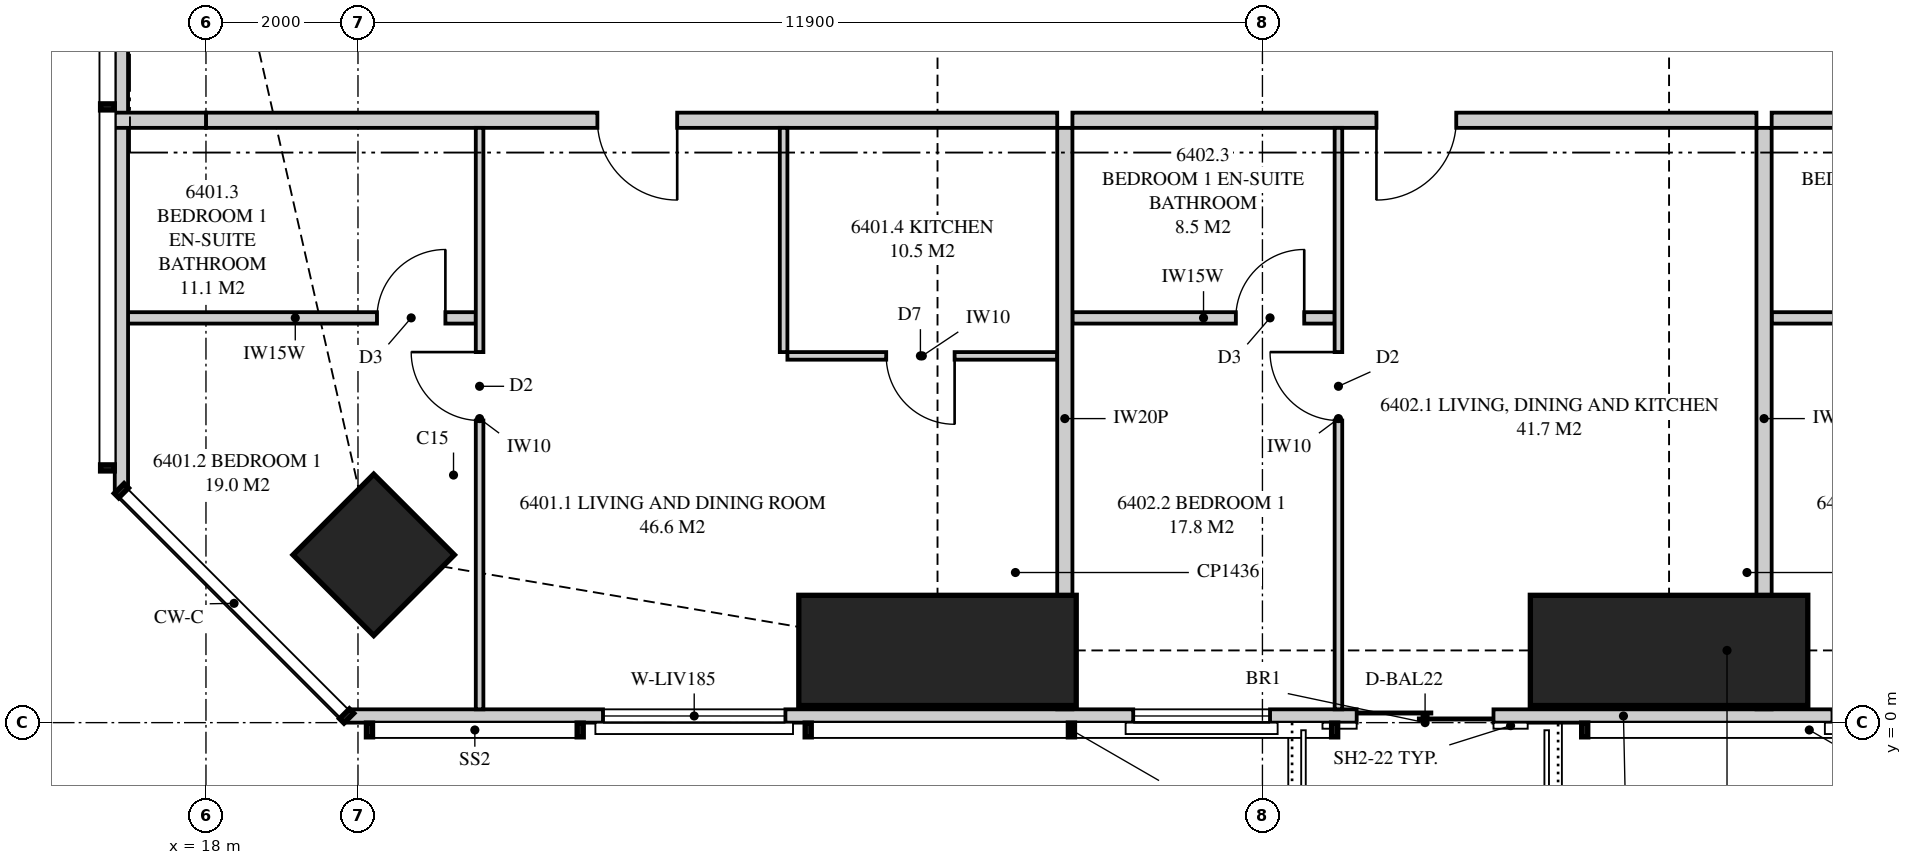
"""IFC4 building model, lengths in metres.
Left out: names, types, materials, properties, quantities, classifications, styles, units other than length and angle.
Written with IfcOpenShell. Run it as: python <this file> out.ifc"""

import sys

from ifc_helpers import new_model, si_unit, direction, frame, frame_2d, origin, origin_2d, place, context, subcontext, project, spatial, polyline, rectangle, outline, extrude, element, fill, save


model = new_model("IFC4")
c1 = context("Model", 3, precision=1e-05, world=origin(), true_north=direction((0.0, 1.0)))
c2 = subcontext(c1, "Body", "Model", "MODEL_VIEW")
j1 = project(units=[si_unit("LENGTHUNIT", "METRE"), si_unit("PLANEANGLEUNIT", "RADIAN")], contexts=[c1])
p1 = place(None, origin())
s1 = spatial("IfcSite", under=j1, at=p1, CompositionType="ELEMENT")
p2 = place(p1, origin())
s2 = spatial("IfcBuilding", under=s1, at=p2, CompositionType="ELEMENT")
p3 = place(p2, frame((0.0, 0.0, 235.45)))
s3 = spatial("IfcBuildingStorey", under=s2, at=p3, CompositionType="ELEMENT", Elevation=235.45)
p4 = place(p3, frame((20.207, 2.207, 0.0), z_axis=(0.0, 0.0, 1.0), x_axis=(0.707106781187, 0.707106781187, 0.0)))
e1 = element("IfcColumn", 1, at=p4, inside=s3, PredefinedType="COLUMN", context=c2, shape_type="SweptSolid", body=[
    extrude(rectangle(XDim=1.5, YDim=1.5, at=origin_2d()), origin(), (0.0, 0.0, 1.0), 3.5),
])
for number, where, z_axis, x_axis in (
    (2, (27.625, 0.95, 0.0), (0.0, 0.0, 1.0), (0.0, 1.0, 0.0)),
    (3, (37.25, 0.95, 0.0), (0.0, 0.0, 1.0), (0.0, 1.0, 0.0)),
):
    element("IfcColumn", number, at=place(p3, frame(where, z_axis=z_axis, x_axis=x_axis)), inside=s3, PredefinedType="COLUMN", context=c2, shape_type="SweptSolid", body=[
        extrude(rectangle(XDim=1.45, YDim=3.65, at=origin_2d()), origin(), (0.0, 0.0, 1.0), 3.5),
    ])
p5 = place(p3, frame((19.851, 0.087, 0.0), z_axis=(0.0, 0.0, 1.0), x_axis=(1.0, 0.0, 0.0)))
e4 = element("IfcWall", 4, at=p5, inside=s3, PredefinedType="SOLIDWALL", context=c2, shape_type="SweptSolid", body=[
    extrude(outline(polyline([(0.0, 0.0), (33.597, 0.0), (33.597, 3.26), (27.239, 3.26), (27.239, 2.3), (27.155, 2.3), (27.155, 3.26), (27.024, 3.26), (27.024, 2.3), (7.774, 2.3), (7.774, 3.26), (7.642, 3.26), (7.642, 2.3), (7.559, 2.3), (7.559, 3.26), (0.0, 3.26), (0.0, 0.0)])), frame((0.0, 0.087, 0.0), z_axis=(0.0, -1.0, 0.0), x_axis=(1.0, 0.0, 0.0)), (0.0, 0.0, 1.0), 0.175),
])
p6 = place(p5, frame((3.373, 0.0, 0.4)))
e5 = element("IfcOpeningElement", 5, at=p6, cuts=e4, PredefinedType="OPENING", context=c2, shape_type="SweptSolid", body=[
    extrude(rectangle(XDim=2.4, YDim=1.85, at=frame_2d((1.2, 0.925))), frame((0.0, 0.097, 0.0), z_axis=(0.0, -1.0, 0.0), x_axis=(1.0, 0.0, 0.0)), (0.0, 0.0, 1.0), 0.195),
])
p7 = place(p5, frame((10.349, 0.0, 0.4)))
e6 = element("IfcOpeningElement", 6, at=p7, cuts=e4, PredefinedType="OPENING", context=c2, shape_type="SweptSolid", body=[
    extrude(rectangle(XDim=1.8, YDim=1.85, at=frame_2d((0.9, 0.925))), frame((0.0, 0.097, 0.0), z_axis=(0.0, -1.0, 0.0), x_axis=(1.0, 0.0, 0.0)), (0.0, 0.0, 1.0), 0.195),
])
p8 = place(p5, frame((13.289, 0.0, 0.0)))
e7 = element("IfcOpeningElement", 7, at=p8, cuts=e4, PredefinedType="OPENING", context=c2, shape_type="SweptSolid", body=[
    extrude(rectangle(XDim=1.8, YDim=2.25, at=frame_2d((0.9, 1.125))), frame((0.0, 0.097, 0.0), z_axis=(0.0, -1.0, 0.0), x_axis=(1.0, 0.0, 0.0)), (0.0, 0.0, 1.0), 0.195),
])
p9 = place(p5, frame((19.549, 0.0, 0.4)))
e8 = element("IfcOpeningElement", 8, at=p9, cuts=e4, PredefinedType="OPENING", context=c2, shape_type="SweptSolid", body=[
    extrude(rectangle(XDim=1.8, YDim=1.85, at=frame_2d((0.9, 0.925))), frame((0.0, 0.097, 0.0), z_axis=(0.0, -1.0, 0.0), x_axis=(1.0, 0.0, 0.0)), (0.0, 0.0, 1.0), 0.195),
])
p10 = place(p5, frame((23.149, 0.0, 0.4)))
e9 = element("IfcOpeningElement", 9, at=p10, cuts=e4, PredefinedType="OPENING", context=c2, shape_type="SweptSolid", body=[
    extrude(rectangle(XDim=1.8, YDim=1.85, at=frame_2d((0.9, 0.925))), frame((0.0, 0.097, 0.0), z_axis=(0.0, -1.0, 0.0), x_axis=(1.0, 0.0, 0.0)), (0.0, 0.0, 1.0), 0.195),
])
p11 = place(p5, frame((28.979, 0.0, 0.4)))
e10 = element("IfcOpeningElement", 10, at=p11, cuts=e4, PredefinedType="OPENING", context=c2, shape_type="SweptSolid", body=[
    extrude(rectangle(XDim=1.8, YDim=1.85, at=frame_2d((0.9, 0.925))), frame((0.0, 0.097, 0.0), z_axis=(0.0, -1.0, 0.0), x_axis=(1.0, 0.0, 0.0)), (0.0, 0.0, 1.0), 0.195),
])
p12 = place(p5, frame((31.861, 0.0, 0.4)))
e11 = element("IfcOpeningElement", 11, at=p12, cuts=e4, PredefinedType="OPENING", context=c2, shape_type="SweptSolid", body=[
    extrude(rectangle(XDim=1.2, YDim=1.85, at=frame_2d((0.6, 0.925))), frame((0.0, 0.097, 0.0), z_axis=(0.0, -1.0, 0.0), x_axis=(1.0, 0.0, 0.0)), (0.0, 0.0, 1.0), 0.195),
])
p13 = place(p3, frame((16.887, 30.949, 0.0), z_axis=(0.0, 0.0, 1.0), x_axis=(0.0, -1.0, 0.0)))
e12 = element("IfcWall", 12, at=p13, inside=s3, PredefinedType="SOLIDWALL", context=c2, shape_type="SweptSolid", body=[
    extrude(outline(polyline([(0.0, 0.0), (27.897, 0.0), (27.897, 3.26), (18.148, 3.26), (18.148, 2.3), (18.125, 2.3), (18.125, 3.26), (17.949, 3.26), (17.949, 2.3), (5.949, 2.3), (5.949, 3.26), (0.0, 3.26), (0.0, 0.0)])), frame((0.0, 0.087, 0.0), z_axis=(0.0, -1.0, 0.0), x_axis=(1.0, 0.0, 0.0)), (0.0, 0.0, 1.0), 0.175),
])
p14 = place(p13, frame((11.849, 0.0, 0.4)))
e13 = element("IfcOpeningElement", 13, at=p14, cuts=e12, PredefinedType="OPENING", context=c2, shape_type="SweptSolid", body=[
    extrude(rectangle(XDim=1.2, YDim=1.85, at=frame_2d((0.6, 0.925))), frame((0.0, 0.097, 0.0), z_axis=(0.0, -1.0, 0.0), x_axis=(1.0, 0.0, 0.0)), (0.0, 0.0, 1.0), 0.195),
])
p15 = place(p3, frame((29.3, 0.175, 0.0), z_axis=(0.0, 0.0, 1.0), x_axis=(0.0, 1.0, 0.0)))
e14 = element("IfcWall", 14, at=p15, inside=s3, PredefinedType="PARTITIONING", context=c2, shape_type="SweptSolid", body=[
    extrude(outline(polyline([(0.0, 0.0), (7.65, 0.0), (7.65, 3.26), (1.685, 3.26), (1.685, 2.3), (0.0, 2.3), (0.0, 3.26), (0.0, 0.0)])), frame((0.0, 0.1, 0.0), z_axis=(0.0, -1.0, 0.0), x_axis=(1.0, 0.0, 0.0)), (0.0, 0.0, 1.0), 0.2),
])
p16 = place(p3, frame((18.0, 7.925, 0.0), z_axis=(0.0, 0.0, 1.0), x_axis=(1.0, 0.0, 0.0)))
e15 = element("IfcWall", 15, at=p16, inside=s3, PredefinedType="PARTITIONING", context=c2, shape_type="SweptSolid", body=[
    extrude(outline(polyline([(0.0, 0.0), (11.2, 0.0), (11.2, 3.26), (10.935, 3.26), (10.935, 2.66), (8.315, 2.66), (8.315, 3.26), (1.839, 3.26), (1.839, 2.3), (0.0, 2.3), (0.0, 3.26), (0.0, 0.0)])), frame((0.0, 0.1, 0.0), z_axis=(0.0, -1.0, 0.0), x_axis=(1.0, 0.0, 0.0)), (0.0, 0.0, 1.0), 0.2),
])
p17 = place(p16, frame((5.15, 0.0, 0.0)))
e16 = element("IfcOpeningElement", 16, at=p17, cuts=e15, PredefinedType="OPENING", context=c2, shape_type="SweptSolid", body=[
    extrude(rectangle(XDim=1.05, YDim=2.2, at=frame_2d((0.525, 1.1))), frame((0.0, 0.11, 0.0), z_axis=(0.0, -1.0, 0.0), x_axis=(1.0, 0.0, 0.0)), (0.0, 0.0, 1.0), 0.22),
])
p18 = place(p3, frame((21.6, 0.175, 0.0), z_axis=(0.0, 0.0, 1.0), x_axis=(0.0, 1.0, 0.0)))
e17 = element("IfcWall", 17, at=p18, inside=s3, PredefinedType="PARTITIONING", context=c2, shape_type="SweptSolid", body=[
    extrude(outline(polyline([(0.0, 0.0), (7.65, 0.0), (7.65, 3.26), (2.668, 3.26), (2.668, 2.3), (0.924, 2.3), (0.924, 3.26), (0.0, 3.26), (0.0, 0.0)])), frame((0.0, 0.05, 0.0), z_axis=(0.0, -1.0, 0.0), x_axis=(1.0, 0.0, 0.0)), (0.0, 0.0, 1.0), 0.1),
])
p19 = place(p18, frame((3.8, 0.0, 0.0)))
e18 = element("IfcOpeningElement", 18, at=p19, cuts=e17, PredefinedType="OPENING", context=c2, shape_type="SweptSolid", body=[
    extrude(rectangle(XDim=0.9, YDim=2.1, at=frame_2d((0.45, 1.05))), frame((0.0, 0.06, 0.0), z_axis=(0.0, -1.0, 0.0), x_axis=(1.0, 0.0, 0.0)), (0.0, 0.0, 1.0), 0.12),
])
p20 = place(p3, frame((16.8, 5.325, 0.0), z_axis=(0.0, 0.0, 1.0), x_axis=(1.0, 0.0, 0.0)))
e19 = element("IfcWall", 19, at=p20, inside=s3, PredefinedType="PLUMBINGWALL", context=c2, shape_type="SweptSolid", body=[
    extrude(outline(polyline([(0.0, 0.0), (4.75, 0.0), (4.75, 3.26), (3.605, 3.26), (3.605, 2.3), (1.79, 2.3), (1.79, 3.26), (0.0, 3.26), (0.0, 0.0)])), frame((0.0, 0.075, 0.0), z_axis=(0.0, -1.0, 0.0), x_axis=(1.0, 0.0, 0.0)), (0.0, 0.0, 1.0), 0.15),
])
p21 = place(p20, frame((3.45, 0.0, 0.0)))
e20 = element("IfcOpeningElement", 20, at=p21, cuts=e19, PredefinedType="OPENING", context=c2, shape_type="SweptSolid", body=[
    extrude(rectangle(XDim=0.9, YDim=2.1, at=frame_2d((0.45, 1.05))), frame((0.0, 0.085, 0.0), z_axis=(0.0, -1.0, 0.0), x_axis=(1.0, 0.0, 0.0)), (0.0, 0.0, 1.0), 0.17),
])
p22 = place(p3, frame((25.65, 4.825, 0.0), z_axis=(0.0, 0.0, 1.0), x_axis=(1.0, 0.0, 0.0)))
e21 = element("IfcWall", 21, at=p22, inside=s3, PredefinedType="PARTITIONING", context=c2, shape_type="SweptSolid", body=[
    extrude(outline(polyline([(0.0, 0.0), (3.55, 0.0), (3.55, 3.26), (3.235, 3.26), (3.235, 2.66), (0.715, 2.66), (0.715, 3.26), (0.0, 3.26), (0.0, 0.0)])), frame((0.0, 0.05, 0.0), z_axis=(0.0, -1.0, 0.0), x_axis=(1.0, 0.0, 0.0)), (0.0, 0.0, 1.0), 0.1),
])
p23 = place(p22, frame((1.3, 0.0, 0.0)))
e22 = element("IfcOpeningElement", 22, at=p23, cuts=e21, PredefinedType="OPENING", context=c2, shape_type="SweptSolid", body=[
    extrude(rectangle(XDim=0.9, YDim=2.1, at=frame_2d((0.45, 1.05))), frame((0.0, 0.06, 0.0), z_axis=(0.0, -1.0, 0.0), x_axis=(1.0, 0.0, 0.0)), (0.0, 0.0, 1.0), 0.12),
])
p24 = place(p3, frame((25.6, 4.875, 0.0), z_axis=(0.0, 0.0, 1.0), x_axis=(0.0, 1.0, 0.0)))
e23 = element("IfcWall", 23, at=p24, inside=s3, PredefinedType="PARTITIONING", context=c2, shape_type="SweptSolid", body=[
    extrude(rectangle(XDim=2.95, YDim=0.1, at=frame_2d((1.475, 0.0))), origin(), (0.0, 0.0, 1.0), 3.26),
])
p25 = place(p3, frame((38.5, 0.175, 0.0), z_axis=(0.0, 0.0, 1.0), x_axis=(0.0, 1.0, 0.0)))
e24 = element("IfcWall", 24, at=p25, inside=s3, PredefinedType="PARTITIONING", context=c2, shape_type="SweptSolid", body=[
    extrude(outline(polyline([(0.529, 2.3), (0.0, 2.3), (0.0, 0.0), (0.529, 0.0), (0.529, 0.281), (1.021, 0.281), (1.021, 0.0), (7.65, 0.0), (7.65, 2.66), (1.685, 2.66), (1.685, 2.3), (1.021, 2.3), (1.021, 2.019), (0.529, 2.019), (0.529, 2.3)])), frame((0.0, 0.1, 0.0), z_axis=(0.0, -1.0, 0.0), x_axis=(1.0, 0.0, 0.0)), (0.0, 0.0, 1.0), 0.2),
])
p26 = place(p3, frame((29.4, 7.925, 0.0), z_axis=(0.0, 0.0, 1.0), x_axis=(1.0, 0.0, 0.0)))
e25 = element("IfcWall", 25, at=p26, inside=s3, PredefinedType="PARTITIONING", context=c2, shape_type="SweptSolid", body=[
    extrude(outline(polyline([(0.0, 0.0), (9.0, 0.0), (9.0, 3.26), (9.0, 2.66), (6.54, 2.66), (6.54, 3.26), (0.0, 3.26), (0.0, 0.0)])), frame((0.0, 0.1, 0.0), z_axis=(0.0, -1.0, 0.0), x_axis=(1.0, 0.0, 0.0)), (0.0, 0.0, 1.0), 0.2),
])
p27 = place(p26, frame((4.0, 0.0, 0.0)))
e26 = element("IfcOpeningElement", 26, at=p27, cuts=e25, PredefinedType="OPENING", context=c2, shape_type="SweptSolid", body=[
    extrude(rectangle(XDim=1.05, YDim=2.2, at=frame_2d((0.525, 1.1))), frame((0.0, 0.11, 0.0), z_axis=(0.0, -1.0, 0.0), x_axis=(1.0, 0.0, 0.0)), (0.0, 0.0, 1.0), 0.22),
])
p28 = place(p3, frame((32.9, 0.175, 0.0), z_axis=(0.0, 0.0, 1.0), x_axis=(0.0, 1.0, 0.0)))
e27 = element("IfcWall", 27, at=p28, inside=s3, PredefinedType="PARTITIONING", context=c2, shape_type="SweptSolid", body=[
    extrude(outline(polyline([(0.0, 0.0), (7.65, 0.0), (7.65, 3.26), (1.635, 3.26), (1.635, 2.3), (0.0, 2.3), (0.0, 3.26), (0.0, 0.0)])), frame((0.0, 0.05, 0.0), z_axis=(0.0, -1.0, 0.0), x_axis=(1.0, 0.0, 0.0)), (0.0, 0.0, 1.0), 0.1),
])
p29 = place(p28, frame((3.8, 0.0, 0.0)))
e28 = element("IfcOpeningElement", 28, at=p29, cuts=e27, PredefinedType="OPENING", context=c2, shape_type="SweptSolid", body=[
    extrude(rectangle(XDim=0.9, YDim=2.1, at=frame_2d((0.45, 1.05))), frame((0.0, 0.06, 0.0), z_axis=(0.0, -1.0, 0.0), x_axis=(1.0, 0.0, 0.0)), (0.0, 0.0, 1.0), 0.12),
])
p30 = place(p3, frame((29.4, 5.325, 0.0), z_axis=(0.0, 0.0, 1.0), x_axis=(1.0, 0.0, 0.0)))
e29 = element("IfcWall", 29, at=p30, inside=s3, PredefinedType="PLUMBINGWALL", context=c2, shape_type="SweptSolid", body=[
    extrude(rectangle(XDim=3.45, YDim=0.15, at=frame_2d((1.725, 0.0))), origin(), (0.0, 0.0, 1.0), 3.26),
])
p31 = place(p30, frame((2.15, 0.0, 0.0)))
e30 = element("IfcOpeningElement", 30, at=p31, cuts=e29, PredefinedType="OPENING", context=c2, shape_type="SweptSolid", body=[
    extrude(rectangle(XDim=0.9, YDim=2.1, at=frame_2d((0.45, 1.05))), frame((0.0, 0.085, 0.0), z_axis=(0.0, -1.0, 0.0), x_axis=(1.0, 0.0, 0.0)), (0.0, 0.0, 1.0), 0.17),
])
p32 = place(p3, frame((38.6, 7.925, 0.0), z_axis=(0.0, 0.0, 1.0), x_axis=(1.0, 0.0, 0.0)))
e31 = element("IfcWall", 31, at=p32, inside=s3, PredefinedType="PARTITIONING", context=c2, shape_type="SweptSolid", body=[
    extrude(outline(polyline([(0.0, 0.0), (17.725, 0.0), (17.725, 3.26), (17.275, 3.26), (17.275, 2.3), (15.443, 2.3), (15.443, 3.26), (9.585, 3.26), (9.585, 2.66), (6.965, 2.66), (6.965, 3.26), (0.0, 3.26), (0.0, 0.0)])), frame((0.0, 0.1, 0.0), z_axis=(0.0, -1.0, 0.0), x_axis=(1.0, 0.0, 0.0)), (0.0, 0.0, 1.0), 0.2),
])
p33 = place(p32, frame((12.9, 0.0, 0.0)))
e32 = element("IfcOpeningElement", 32, at=p33, cuts=e31, PredefinedType="OPENING", context=c2, shape_type="SweptSolid", body=[
    extrude(rectangle(XDim=1.05, YDim=2.2, at=frame_2d((0.525, 1.1))), frame((0.0, 0.11, 0.0), z_axis=(0.0, -1.0, 0.0), x_axis=(1.0, 0.0, 0.0)), (0.0, 0.0, 1.0), 0.22),
])
p34 = place(p3, frame((38.6, 5.325, 0.0), z_axis=(0.0, 0.0, 1.0), x_axis=(1.0, 0.0, 0.0)))
e33 = element("IfcWall", 33, at=p34, inside=s3, PredefinedType="PLUMBINGWALL", context=c2, shape_type="SweptSolid", body=[
    extrude(rectangle(XDim=3.45, YDim=0.15, at=frame_2d((1.725, 0.0))), origin(), (0.0, 0.0, 1.0), 3.26),
])
p35 = place(p34, frame((2.15, 0.0, 0.0)))
e34 = element("IfcOpeningElement", 34, at=p35, cuts=e33, PredefinedType="OPENING", context=c2, shape_type="SweptSolid", body=[
    extrude(rectangle(XDim=0.9, YDim=2.1, at=frame_2d((0.45, 1.05))), frame((0.0, 0.085, 0.0), z_axis=(0.0, -1.0, 0.0), x_axis=(1.0, 0.0, 0.0)), (0.0, 0.0, 1.0), 0.17),
])
p36 = place(p3, frame((16.8, 7.925, 0.0), z_axis=(0.0, 0.0, 1.0), x_axis=(1.0, 0.0, 0.0)))
e35 = element("IfcWall", 35, at=p36, inside=s3, PredefinedType="PARTITIONING", context=c2, shape_type="SweptSolid", body=[
    extrude(outline(polyline([(0.0, 0.0), (1.2, 0.0), (1.2, 3.26), (1.2, 2.3), (1.172, 2.3), (1.172, 3.26), (0.0, 3.26), (0.0, 0.0)])), frame((0.0, 0.1, 0.0), z_axis=(0.0, -1.0, 0.0), x_axis=(1.0, 0.0, 0.0)), (0.0, 0.0, 1.0), 0.2),
])
p37 = place(p6, origin())
e36 = element("IfcWindow", 36, at=p37, inside=s3, PartitioningType="SINGLE_PANEL", PredefinedType="WINDOW", context=c2, shape_type="SweptSolid", body=[
    extrude(rectangle(XDim=2.4, YDim=1.85, at=frame_2d((1.2, 0.925))), frame((0.0, 0.03, 0.0), z_axis=(0.0, -1.0, 0.0), x_axis=(1.0, 0.0, 0.0)), (0.0, 0.0, 1.0), 0.06),
])
fill(e5, e36)
p38 = place(p7, origin())
e37 = element("IfcWindow", 37, at=p38, inside=s3, PartitioningType="SINGLE_PANEL", PredefinedType="WINDOW", context=c2, shape_type="SweptSolid", body=[
    extrude(rectangle(XDim=1.8, YDim=1.85, at=frame_2d((0.9, 0.925))), frame((0.0, 0.03, 0.0), z_axis=(0.0, -1.0, 0.0), x_axis=(1.0, 0.0, 0.0)), (0.0, 0.0, 1.0), 0.06),
])
fill(e6, e37)
p39 = place(p8, origin())
e38 = element("IfcDoor", 38, at=p39, inside=s3, OperationType="SLIDING_TO_LEFT", PredefinedType="DOOR", context=c2, shape_type="SweptSolid", body=[
    extrude(rectangle(XDim=1.8, YDim=2.25, at=frame_2d((0.9, 1.125))), frame((0.0, 0.025, 0.0), z_axis=(0.0, -1.0, 0.0), x_axis=(1.0, 0.0, 0.0)), (0.0, 0.0, 1.0), 0.05),
])
fill(e7, e38)
p40 = place(p9, origin())
e39 = element("IfcWindow", 39, at=p40, inside=s3, PartitioningType="SINGLE_PANEL", PredefinedType="WINDOW", context=c2, shape_type="SweptSolid", body=[
    extrude(rectangle(XDim=1.8, YDim=1.85, at=frame_2d((0.9, 0.925))), frame((0.0, 0.03, 0.0), z_axis=(0.0, -1.0, 0.0), x_axis=(1.0, 0.0, 0.0)), (0.0, 0.0, 1.0), 0.06),
])
fill(e8, e39)
p41 = place(p17, frame((1.05, 0.0, 0.0), z_axis=(0.0, 0.0, 1.0), x_axis=(-1.0, 0.0, 0.0)))
e40 = element("IfcDoor", 40, at=p41, inside=s3, OperationType="SINGLE_SWING_LEFT", PredefinedType="DOOR", context=c2, shape_type="SweptSolid", body=[
    extrude(rectangle(XDim=1.05, YDim=2.2, at=frame_2d((0.525, 1.1))), frame((0.0, 0.025, 0.0), z_axis=(0.0, -1.0, 0.0), x_axis=(1.0, 0.0, 0.0)), (0.0, 0.0, 1.0), 0.05),
])
fill(e16, e40)
p42 = place(p19, origin())
e41 = element("IfcDoor", 41, at=p42, inside=s3, OperationType="SINGLE_SWING_RIGHT", PredefinedType="DOOR", context=c2, shape_type="SweptSolid", body=[
    extrude(rectangle(XDim=0.9, YDim=2.1, at=frame_2d((0.45, 1.05))), frame((0.0, 0.025, 0.0), z_axis=(0.0, -1.0, 0.0), x_axis=(1.0, 0.0, 0.0)), (0.0, 0.0, 1.0), 0.05),
])
fill(e18, e41)
p43 = place(p21, origin())
e42 = element("IfcDoor", 42, at=p43, inside=s3, OperationType="SINGLE_SWING_RIGHT", PredefinedType="DOOR", context=c2, shape_type="SweptSolid", body=[
    extrude(rectangle(XDim=0.9, YDim=2.1, at=frame_2d((0.45, 1.05))), frame((0.0, 0.025, 0.0), z_axis=(0.0, -1.0, 0.0), x_axis=(1.0, 0.0, 0.0)), (0.0, 0.0, 1.0), 0.05),
])
fill(e20, e42)
p44 = place(p23, frame((0.9, 0.0, 0.0), z_axis=(0.0, 0.0, 1.0), x_axis=(-1.0, 0.0, 0.0)))
e43 = element("IfcDoor", 43, at=p44, inside=s3, OperationType="SINGLE_SWING_LEFT", PredefinedType="DOOR", context=c2, shape_type="SweptSolid", body=[
    extrude(rectangle(XDim=0.9, YDim=2.1, at=frame_2d((0.45, 1.05))), frame((0.0, 0.025, 0.0), z_axis=(0.0, -1.0, 0.0), x_axis=(1.0, 0.0, 0.0)), (0.0, 0.0, 1.0), 0.05),
])
fill(e22, e43)
p45 = place(p27, frame((1.05, 0.0, 0.0), z_axis=(0.0, 0.0, 1.0), x_axis=(-1.0, 0.0, 0.0)))
e44 = element("IfcDoor", 44, at=p45, inside=s3, OperationType="SINGLE_SWING_RIGHT", PredefinedType="DOOR", context=c2, shape_type="SweptSolid", body=[
    extrude(rectangle(XDim=1.05, YDim=2.2, at=frame_2d((0.525, 1.1))), frame((0.0, 0.025, 0.0), z_axis=(0.0, -1.0, 0.0), x_axis=(1.0, 0.0, 0.0)), (0.0, 0.0, 1.0), 0.05),
])
fill(e26, e44)
p46 = place(p29, origin())
e45 = element("IfcDoor", 45, at=p46, inside=s3, OperationType="SINGLE_SWING_RIGHT", PredefinedType="DOOR", context=c2, shape_type="SweptSolid", body=[
    extrude(rectangle(XDim=0.9, YDim=2.1, at=frame_2d((0.45, 1.05))), frame((0.0, 0.025, 0.0), z_axis=(0.0, -1.0, 0.0), x_axis=(1.0, 0.0, 0.0)), (0.0, 0.0, 1.0), 0.05),
])
fill(e28, e45)
p47 = place(p31, origin())
e46 = element("IfcDoor", 46, at=p47, inside=s3, OperationType="SINGLE_SWING_RIGHT", PredefinedType="DOOR", context=c2, shape_type="SweptSolid", body=[
    extrude(rectangle(XDim=0.9, YDim=2.1, at=frame_2d((0.45, 1.05))), frame((0.0, 0.025, 0.0), z_axis=(0.0, -1.0, 0.0), x_axis=(1.0, 0.0, 0.0)), (0.0, 0.0, 1.0), 0.05),
])
fill(e30, e46)
save(model, sys.argv[1])
